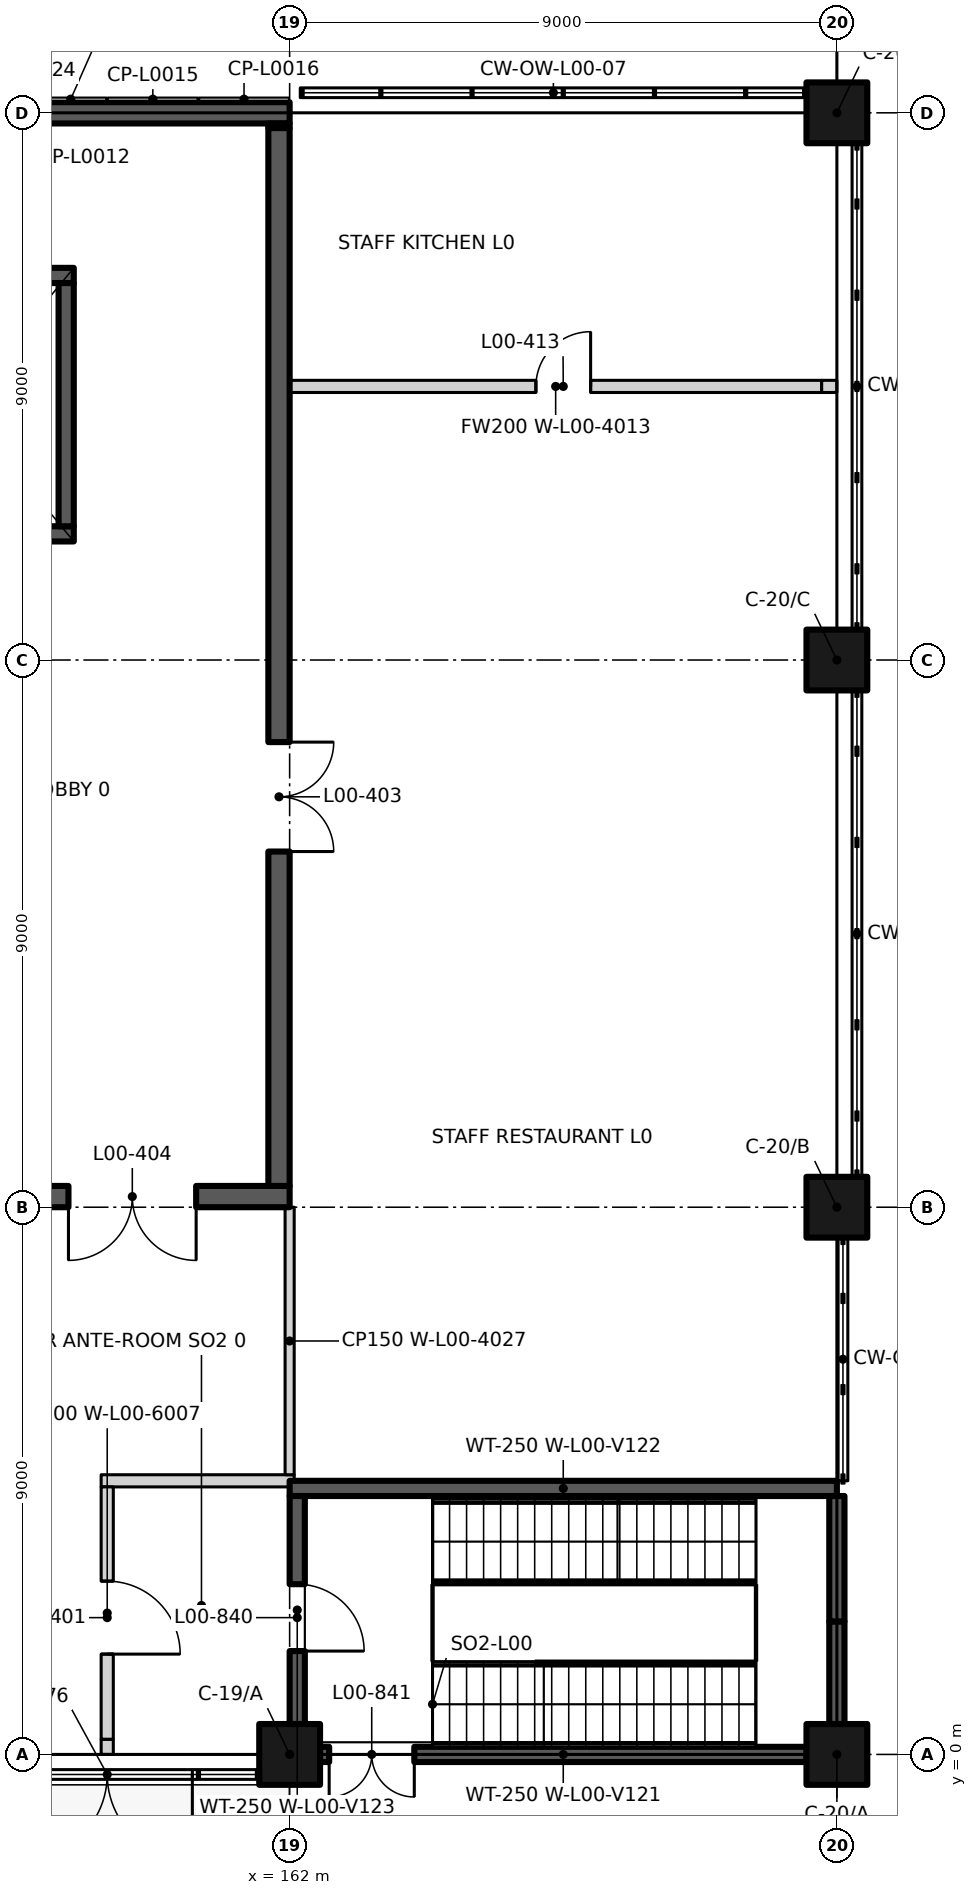
"""IFC4 building model, lengths in metres.
Left out: names, types, materials, properties, quantities, classifications, styles, units other than length and angle.
Written with IfcOpenShell. Run it as: python <this file> out.ifc"""

import sys

from ifc_helpers import new_model, si_unit, direction, frame, frame_2d, origin, origin_2d, place, context, subcontext, project, spatial, rectangle, extrude, element, fill, save


model = new_model("IFC4")
c1 = context("Model", 3, precision=1e-05, world=origin(), true_north=direction((0.0, 1.0)))
c2 = subcontext(c1, "Body", "Model", "MODEL_VIEW")
j1 = project(units=[si_unit("LENGTHUNIT", "METRE"), si_unit("PLANEANGLEUNIT", "RADIAN")], contexts=[c1])
p1 = place(None, origin())
s1 = spatial("IfcSite", under=j1, at=p1, CompositionType="ELEMENT")
p2 = place(p1, origin())
s2 = spatial("IfcBuilding", under=s1, at=p2, CompositionType="ELEMENT")
p3 = place(p2, origin())
s3 = spatial("IfcBuildingStorey", under=s2, at=p3, CompositionType="ELEMENT", Elevation=0.0)
for number, where, z_axis, x_axis in (
    (1, (162.0, 0.0, 0.0), (0.0, 0.0, 1.0), (1.0, 0.0, 0.0)),
    (2, (171.0, 0.0, 0.0), (0.0, 0.0, 1.0), (1.0, 0.0, 0.0)),
    (3, (171.0, 9.0, 0.0), (0.0, 0.0, 1.0), (1.0, 0.0, 0.0)),
    (4, (171.0, 18.0, 0.0), (0.0, 0.0, 1.0), (1.0, 0.0, 0.0)),
    (5, (171.0, 27.0, 0.0), (0.0, 0.0, 1.0), (1.0, 0.0, 0.0)),
):
    element("IfcColumn", number, at=place(p3, frame(where, z_axis=z_axis, x_axis=x_axis)), inside=s3, PredefinedType="COLUMN", context=c2, shape_type="SweptSolid", body=[
        extrude(rectangle(XDim=1.0, YDim=1.0, at=origin_2d()), origin(), (0.0, 0.0, 1.0), 6.0),
    ])
p4 = place(p3, frame((162.5, 0.0, 0.0), z_axis=(0.0, 0.0, 1.0), x_axis=(1.0, 0.0, 0.0)))
e6 = element("IfcWall", 6, at=p4, inside=s3, PredefinedType="SHEAR", context=c2, shape_type="SweptSolid", body=[
    extrude(rectangle(XDim=8.0, YDim=0.25, at=frame_2d((4.0, 0.0))), origin(), (0.0, 0.0, 1.0), 6.0),
])
p5 = place(p4, frame((1.55, 0.0, 0.0), z_axis=(0.0, 0.0, 1.0), x_axis=(-1.0, 0.0, 0.0)))
e7 = element("IfcOpeningElement", 7, at=p5, cuts=e6, PredefinedType="OPENING", context=c2, shape_type="SweptSolid", body=[
    extrude(rectangle(XDim=1.4, YDim=2.1, at=frame_2d((0.7, 1.05))), frame((0.0, 0.135, 0.0), z_axis=(0.0, -1.0, 0.0), x_axis=(1.0, 0.0, 0.0)), (0.0, 0.0, 1.0), 0.27),
])
p6 = place(p3, frame((162.0, 4.375, 0.0), z_axis=(0.0, 0.0, 1.0), x_axis=(1.0, 0.0, 0.0)))
e8 = element("IfcWall", 8, at=p6, inside=s3, PredefinedType="SHEAR", context=c2, shape_type="SweptSolid", body=[
    extrude(rectangle(XDim=9.0, YDim=0.25, at=frame_2d((4.5, 0.0))), origin(), (0.0, 0.0, 1.0), 6.0),
])
p7 = place(p3, frame((162.125, 0.5, 0.0), z_axis=(0.0, 0.0, 1.0), x_axis=(0.0, 1.0, 0.0)))
e9 = element("IfcWall", 9, at=p7, inside=s3, PredefinedType="SHEAR", context=c2, shape_type="SweptSolid", body=[
    extrude(rectangle(XDim=3.75, YDim=0.25, at=frame_2d((1.875, 0.0))), origin(), (0.0, 0.0, 1.0), 6.0),
])
p8 = place(p7, frame((2.3, 0.0, 0.0), z_axis=(0.0, 0.0, 1.0), x_axis=(-1.0, 0.0, 0.0)))
e10 = element("IfcOpeningElement", 10, at=p8, cuts=e9, PredefinedType="OPENING", context=c2, shape_type="SweptSolid", body=[
    extrude(rectangle(XDim=1.1, YDim=2.1, at=frame_2d((0.55, 1.05))), frame((0.0, 0.135, 0.0), z_axis=(0.0, -1.0, 0.0), x_axis=(1.0, 0.0, 0.0)), (0.0, 0.0, 1.0), 0.27),
])
p9 = place(p3, frame((171.0, 0.5, 0.0), z_axis=(0.0, 0.0, 1.0), x_axis=(0.0, 1.0, 0.0)))
e11 = element("IfcWall", 11, at=p9, inside=s3, PredefinedType="SHEAR", context=c2, shape_type="SweptSolid", body=[
    extrude(rectangle(XDim=1.688, YDim=0.25, at=frame_2d((0.844, 0.0))), origin(), (0.0, 0.0, 1.0), 6.0),
])
p10 = place(p3, frame((171.0, 2.188, 0.0), z_axis=(0.0, 0.0, 1.0), x_axis=(0.0, 1.0, 0.0)))
e12 = element("IfcWall", 12, at=p10, inside=s3, PredefinedType="SHEAR", context=c2, shape_type="SweptSolid", body=[
    extrude(rectangle(XDim=2.062, YDim=0.25, at=frame_2d((1.031, 0.0))), origin(), (0.0, 0.0, 1.0), 6.0),
])
p11 = place(p3, frame((154.75, 20.075, 0.0), z_axis=(0.0, 0.0, 1.0), x_axis=(1.0, 0.0, 0.0)))
e13 = element("IfcWall", 13, at=p11, inside=s3, PredefinedType="SHEAR", context=c2, shape_type="SweptSolid", body=[
    extrude(rectangle(XDim=3.7, YDim=0.25, at=frame_2d((1.85, 0.0))), origin(), (0.0, 0.0, 1.0), 6.0),
])
p12 = place(p11, frame((1.15, 0.0, 0.0)))
e14 = element("IfcOpeningElement", 14, at=p12, cuts=e13, PredefinedType="OPENING", context=c2, shape_type="SweptSolid", body=[
    extrude(rectangle(XDim=1.4, YDim=2.1, at=frame_2d((0.7, 1.05))), frame((0.0, 0.135, 0.0), z_axis=(0.0, -1.0, 0.0), x_axis=(1.0, 0.0, 0.0)), (0.0, 0.0, 1.0), 0.27),
])
p13 = place(p3, frame((154.75, 24.325, 0.0), z_axis=(0.0, 0.0, 1.0), x_axis=(1.0, 0.0, 0.0)))
e15 = element("IfcWall", 15, at=p13, inside=s3, PredefinedType="SHEAR", context=c2, shape_type="SweptSolid", body=[
    extrude(rectangle(XDim=3.7, YDim=0.25, at=frame_2d((1.85, 0.0))), origin(), (0.0, 0.0, 1.0), 6.0),
])
p14 = place(p3, frame((158.325, 20.2, 0.0), z_axis=(0.0, 0.0, 1.0), x_axis=(0.0, 1.0, 0.0)))
e16 = element("IfcWall", 16, at=p14, inside=s3, PredefinedType="SHEAR", context=c2, shape_type="SweptSolid", body=[
    extrude(rectangle(XDim=4.0, YDim=0.25, at=frame_2d((2.0, 0.0))), origin(), (0.0, 0.0, 1.0), 6.0),
])
p15 = place(p3, frame((160.47, -0.33, 0.0), z_axis=(0.0, 0.0, 1.0), x_axis=(-1.0, 0.0, 0.0)))
e17 = element("IfcWall", 17, at=p15, inside=s3, PredefinedType="STANDARD", context=c2, shape_type="SweptSolid", body=[
    extrude(rectangle(XDim=2.94, YDim=0.12, at=frame_2d((1.47, 0.0))), origin(), (0.0, 0.0, 1.0), 2.97),
])
p16 = place(p15, frame((0.07, 0.0, 0.0)))
e18 = element("IfcOpeningElement", 18, at=p16, cuts=e17, PredefinedType="OPENING", context=c2, shape_type="SweptSolid", body=[
    extrude(rectangle(XDim=2.8, YDim=2.4, at=frame_2d((1.4, 1.2))), frame((0.0, 0.07, 0.0), z_axis=(0.0, -1.0, 0.0), x_axis=(1.0, 0.0, 0.0)), (0.0, 0.0, 1.0), 0.14),
])
p17 = place(p3, frame((144.0, 27.0, 0.0), z_axis=(0.0, 0.0, 1.0), x_axis=(1.0, 0.0, 0.0)))
e19 = element("IfcWall", 19, at=p17, inside=s3, PredefinedType="SOLIDWALL", context=c2, shape_type="SweptSolid", body=[
    extrude(rectangle(XDim=18.0, YDim=0.35, at=frame_2d((9.0, 0.0))), origin(), (0.0, 0.0, 1.0), 5.1),
])
p18 = place(p17, frame((3.1, 0.0, 0.0)))
e20 = element("IfcOpeningElement", 20, at=p18, cuts=e19, PredefinedType="OPENING", context=c2, shape_type="SweptSolid", body=[
    extrude(rectangle(XDim=2.8, YDim=2.4, at=frame_2d((1.4, 1.2))), frame((0.0, 0.185, 0.0), z_axis=(0.0, -1.0, 0.0), x_axis=(1.0, 0.0, 0.0)), (0.0, 0.0, 1.0), 0.37),
])
p19 = place(p17, frame((13.2, 0.0, 0.6)))
e21 = element("IfcOpeningElement", 21, at=p19, cuts=e19, PredefinedType="OPENING", context=c2, shape_type="SweptSolid", body=[
    extrude(rectangle(XDim=0.6, YDim=2.4, at=frame_2d((0.3, 1.2))), frame((0.0, 0.185, 0.0), z_axis=(0.0, -1.0, 0.0), x_axis=(1.0, 0.0, 0.0)), (0.0, 0.0, 1.0), 0.37),
])
p20 = place(p3, frame((158.9, 4.5, 0.0), z_axis=(0.0, 0.0, 1.0), x_axis=(1.0, 0.0, 0.0)))
e22 = element("IfcWall", 22, at=p20, inside=s3, PredefinedType="PARTITIONING", context=c2, shape_type="SweptSolid", body=[
    extrude(rectangle(XDim=3.175, YDim=0.2, at=frame_2d((1.587, 0.0))), origin(), (0.0, 0.0, 1.0), 5.7),
])
p21 = place(p3, frame((144.0, 9.175, 0.0), z_axis=(0.0, 0.0, 1.0), x_axis=(1.0, 0.0, 0.0)))
e23 = element("IfcWall", 23, at=p21, inside=s3, PredefinedType="SHEAR", context=c2, shape_type="SweptSolid", body=[
    extrude(rectangle(XDim=18.0, YDim=0.35, at=frame_2d((9.0, 0.0))), origin(), (0.0, 0.0, 1.0), 5.7),
])
p22 = place(p21, frame((16.463, 0.0, 0.0), z_axis=(0.0, 0.0, 1.0), x_axis=(-1.0, 0.0, 0.0)))
e24 = element("IfcOpeningElement", 24, at=p22, cuts=e23, PredefinedType="OPENING", context=c2, shape_type="SweptSolid", body=[
    extrude(rectangle(XDim=2.1, YDim=2.4, at=frame_2d((1.05, 1.2))), frame((0.0, 0.185, 0.0), z_axis=(0.0, -1.0, 0.0), x_axis=(1.0, 0.0, 0.0)), (0.0, 0.0, 1.0), 0.37),
])
p23 = place(p3, frame((162.0, 22.5, 0.0), z_axis=(0.0, 0.0, 1.0), x_axis=(1.0, 0.0, 0.0)))
e25 = element("IfcWall", 25, at=p23, inside=s3, PredefinedType="PARTITIONING", context=c2, shape_type="SweptSolid", body=[
    extrude(rectangle(XDim=8.75, YDim=0.2, at=frame_2d((4.375, 0.0))), origin(), (0.0, 0.0, 1.0), 5.7),
])
p24 = place(p23, frame((4.05, 0.0, 0.0)))
e26 = element("IfcOpeningElement", 26, at=p24, cuts=e25, PredefinedType="OPENING", context=c2, shape_type="SweptSolid", body=[
    extrude(rectangle(XDim=0.9, YDim=2.1, at=frame_2d((0.45, 1.05))), frame((0.0, 0.11, 0.0), z_axis=(0.0, -1.0, 0.0), x_axis=(1.0, 0.0, 0.0)), (0.0, 0.0, 1.0), 0.22),
])
for number, where, z_axis, x_axis in (
    (27, (170.75, 22.5, 0.0), (0.0, 0.0, 1.0), (1.0, 0.0, 0.0)),
    (28, (159.0, 0.0, 0.0), (0.0, 0.0, 1.0), (0.0, 1.0, 0.0)),
):
    element("IfcWall", number, at=place(p3, frame(where, z_axis=z_axis, x_axis=x_axis)), inside=s3, PredefinedType="PARTITIONING", context=c2, shape_type="SweptSolid", body=[
        extrude(rectangle(XDim=0.25, YDim=0.2, at=frame_2d((0.125, 0.0))), origin(), (0.0, 0.0, 1.0), 5.1),
    ])
p25 = place(p3, frame((159.0, 0.25, 0.0), z_axis=(0.0, 0.0, 1.0), x_axis=(0.0, 1.0, 0.0)))
e29 = element("IfcWall", 29, at=p25, inside=s3, PredefinedType="PARTITIONING", context=c2, shape_type="SweptSolid", body=[
    extrude(rectangle(XDim=4.15, YDim=0.2, at=frame_2d((2.075, 0.0))), origin(), (0.0, 0.0, 1.0), 5.7),
])
p26 = place(p25, frame((2.6, 0.0, 0.0), z_axis=(0.0, 0.0, 1.0), x_axis=(-1.0, 0.0, 0.0)))
e30 = element("IfcOpeningElement", 30, at=p26, cuts=e29, PredefinedType="OPENING", context=c2, shape_type="SweptSolid", body=[
    extrude(rectangle(XDim=1.2, YDim=2.1, at=frame_2d((0.6, 1.05))), frame((0.0, 0.11, 0.0), z_axis=(0.0, -1.0, 0.0), x_axis=(1.0, 0.0, 0.0)), (0.0, 0.0, 1.0), 0.22),
])
p27 = place(p3, frame((161.825, 9.35, 0.0), z_axis=(0.0, 0.0, 1.0), x_axis=(0.0, 1.0, 0.0)))
e31 = element("IfcWall", 31, at=p27, inside=s3, PredefinedType="SHEAR", context=c2, shape_type="SweptSolid", body=[
    extrude(rectangle(XDim=17.4, YDim=0.35, at=frame_2d((8.7, 0.0))), origin(), (0.0, 0.0, 1.0), 5.7),
])
p28 = place(p27, frame((7.3, 0.0, 0.0), z_axis=(0.0, 0.0, 1.0), x_axis=(-1.0, 0.0, 0.0)))
e32 = element("IfcOpeningElement", 32, at=p28, cuts=e31, PredefinedType="OPENING", context=c2, shape_type="SweptSolid", body=[
    extrude(rectangle(XDim=1.8, YDim=2.4, at=frame_2d((0.9, 1.2))), frame((0.0, 0.185, 0.0), z_axis=(0.0, -1.0, 0.0), x_axis=(1.0, 0.0, 0.0)), (0.0, 0.0, 1.0), 0.37),
])
p29 = place(p3, frame((161.825, 26.75, 0.0), z_axis=(0.0, 0.0, 1.0), x_axis=(0.0, 1.0, 0.0)))
e33 = element("IfcWall", 33, at=p29, inside=s3, PredefinedType="SHEAR", context=c2, shape_type="SweptSolid", body=[
    extrude(rectangle(XDim=0.075, YDim=0.35, at=frame_2d((0.038, 0.0))), origin(), (0.0, 0.0, 1.0), 5.1),
])
p30 = place(p3, frame((162.0, 4.6, 0.0), z_axis=(0.0, 0.0, 1.0), x_axis=(0.0, 1.0, 0.0)))
e34 = element("IfcWall", 34, at=p30, inside=s3, PredefinedType="PARTITIONING", context=c2, shape_type="SweptSolid", body=[
    extrude(rectangle(XDim=4.4, YDim=0.15, at=frame_2d((2.2, 0.0))), origin(), (0.0, 0.0, 1.0), 5.7),
])
p31 = place(p8, origin())
e35 = element("IfcDoor", 35, at=p31, inside=s3, OperationType="SINGLE_SWING_RIGHT", PredefinedType="DOOR", context=c2, shape_type="SweptSolid", body=[
    extrude(rectangle(XDim=1.1, YDim=2.1, at=frame_2d((0.55, 1.05))), frame((0.0, 0.025, 0.0), z_axis=(0.0, -1.0, 0.0), x_axis=(1.0, 0.0, 0.0)), (0.0, 0.0, 1.0), 0.05),
])
fill(e10, e35)
p32 = place(p5, origin())
e36 = element("IfcDoor", 36, at=p32, inside=s3, OperationType="DOUBLE_DOOR_SINGLE_SWING", PredefinedType="DOOR", context=c2, shape_type="SweptSolid", body=[
    extrude(rectangle(XDim=1.4, YDim=2.1, at=frame_2d((0.7, 1.05))), frame((0.0, 0.025, 0.0), z_axis=(0.0, -1.0, 0.0), x_axis=(1.0, 0.0, 0.0)), (0.0, 0.0, 1.0), 0.05),
])
fill(e7, e36)
p33 = place(p16, origin())
e37 = element("IfcDoor", 37, at=p33, inside=s3, OperationType="DOUBLE_DOOR_SINGLE_SWING", PredefinedType="DOOR", context=c2, shape_type="SweptSolid", body=[
    extrude(rectangle(XDim=2.8, YDim=2.4, at=frame_2d((1.4, 1.2))), frame((0.0, 0.025, 0.0), z_axis=(0.0, -1.0, 0.0), x_axis=(1.0, 0.0, 0.0)), (0.0, 0.0, 1.0), 0.05),
])
fill(e18, e37)
p34 = place(p26, origin())
e38 = element("IfcDoor", 38, at=p34, inside=s3, OperationType="SINGLE_SWING_RIGHT", PredefinedType="DOOR", context=c2, shape_type="SweptSolid", body=[
    extrude(rectangle(XDim=1.2, YDim=2.1, at=frame_2d((0.6, 1.05))), frame((0.0, 0.025, 0.0), z_axis=(0.0, -1.0, 0.0), x_axis=(1.0, 0.0, 0.0)), (0.0, 0.0, 1.0), 0.05),
])
fill(e30, e38)
p35 = place(p28, origin())
e39 = element("IfcDoor", 39, at=p35, inside=s3, OperationType="DOUBLE_DOOR_SINGLE_SWING", PredefinedType="DOOR", context=c2, shape_type="SweptSolid", body=[
    extrude(rectangle(XDim=1.8, YDim=2.4, at=frame_2d((0.9, 1.2))), frame((0.0, 0.025, 0.0), z_axis=(0.0, -1.0, 0.0), x_axis=(1.0, 0.0, 0.0)), (0.0, 0.0, 1.0), 0.05),
])
fill(e32, e39)
p36 = place(p22, origin())
e40 = element("IfcDoor", 40, at=p36, inside=s3, OperationType="DOUBLE_DOOR_SINGLE_SWING", PredefinedType="DOOR", context=c2, shape_type="SweptSolid", body=[
    extrude(rectangle(XDim=2.1, YDim=2.4, at=frame_2d((1.05, 1.2))), frame((0.0, 0.025, 0.0), z_axis=(0.0, -1.0, 0.0), x_axis=(1.0, 0.0, 0.0)), (0.0, 0.0, 1.0), 0.05),
])
fill(e24, e40)
p37 = place(p24, origin())
e41 = element("IfcDoor", 41, at=p37, inside=s3, OperationType="SINGLE_SWING_RIGHT", PredefinedType="DOOR", context=c2, shape_type="SweptSolid", body=[
    extrude(rectangle(XDim=0.9, YDim=2.1, at=frame_2d((0.45, 1.05))), frame((0.0, 0.025, 0.0), z_axis=(0.0, -1.0, 0.0), x_axis=(1.0, 0.0, 0.0)), (0.0, 0.0, 1.0), 0.05),
])
fill(e26, e41)
save(model, sys.argv[1])
